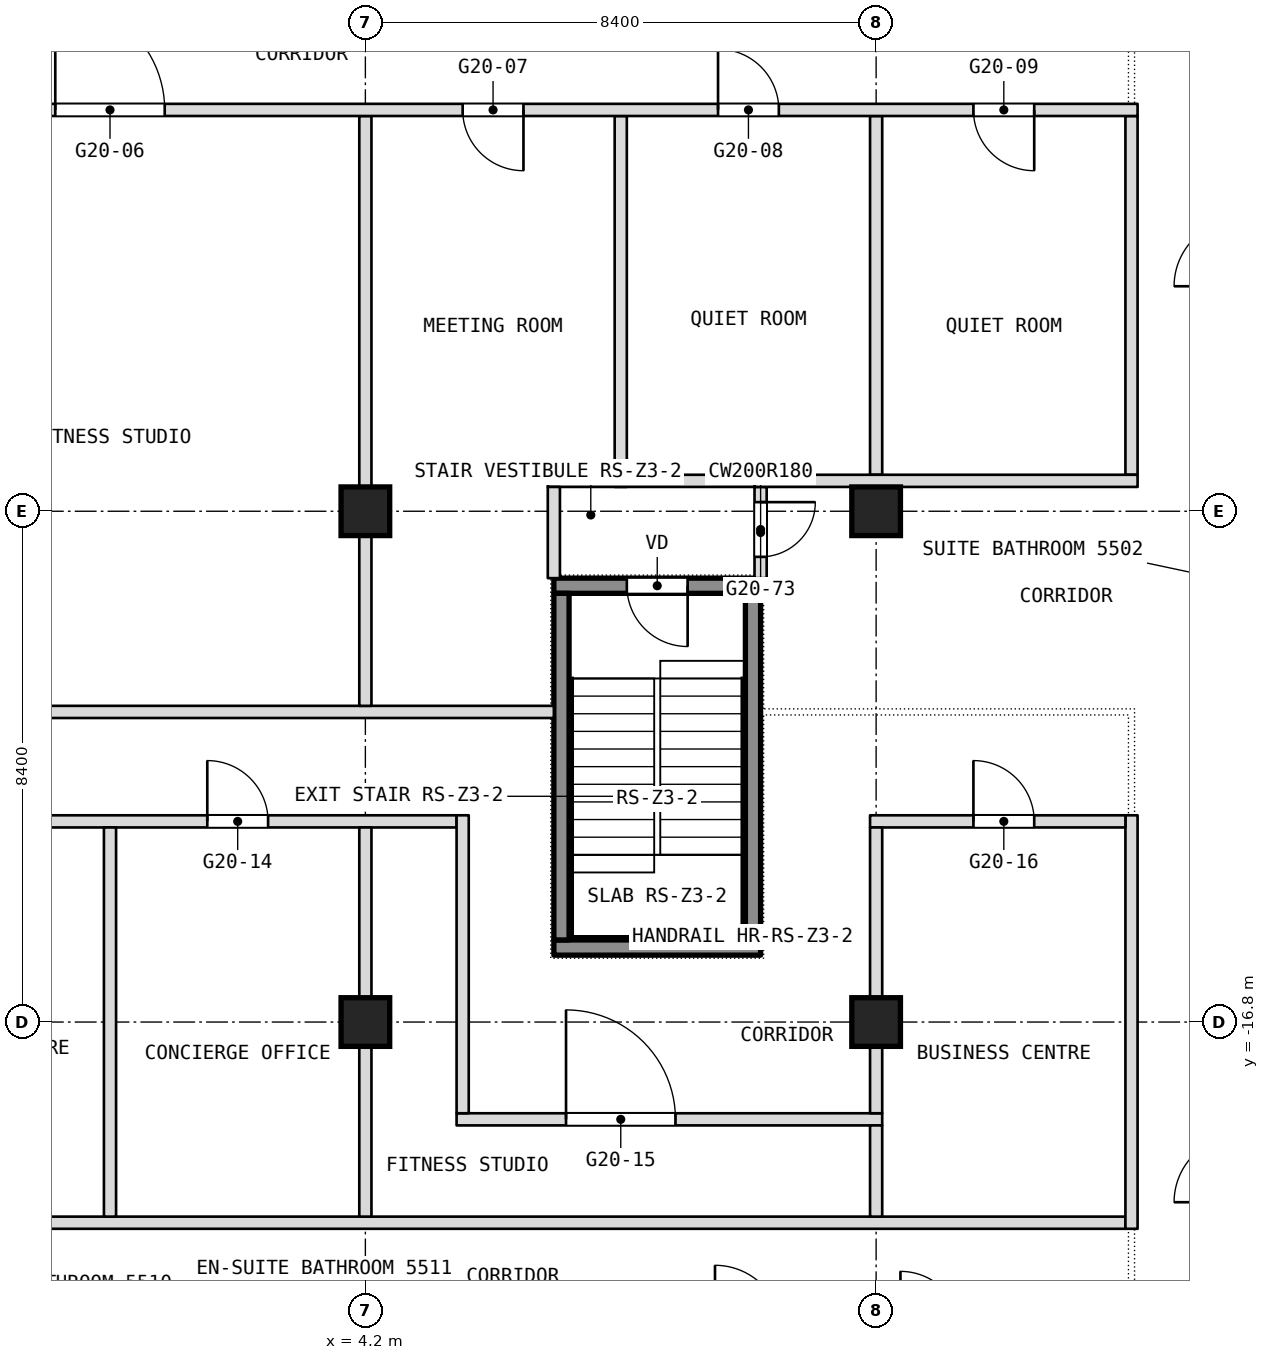
"""IFC4 building model, lengths in metres.
Left out: names, types, materials, properties, quantities, classifications, styles, units other than length and angle.
Written with IfcOpenShell. Run it as: python <this file> out.ifc"""

import sys

from ifc_helpers import new_model, si_unit, direction, frame, frame_2d, origin, origin_2d, place, context, subcontext, project, spatial, rectangle, extrude, element, fill, save


model = new_model("IFC4")
c1 = context("Model", 3, precision=1e-05, world=origin(), true_north=direction((0.0, 1.0)))
c2 = subcontext(c1, "Body", "Model", "MODEL_VIEW")
j1 = project(units=[si_unit("LENGTHUNIT", "METRE"), si_unit("PLANEANGLEUNIT", "RADIAN")], contexts=[c1])
p1 = place(None, origin())
s1 = spatial("IfcSite", under=j1, at=p1, CompositionType="ELEMENT")
p2 = place(p1, origin())
s2 = spatial("IfcBuilding", under=s1, at=p2, CompositionType="ELEMENT")
p3 = place(p2, frame((0.0, 0.0, 234.5)))
s3 = spatial("IfcBuildingStorey", under=s2, at=p3, CompositionType="ELEMENT", Elevation=234.5)
for number, where, z_axis, x_axis in (
    (1, (4.2, -16.8, 0.0), (0.0, 0.0, 1.0), (1.0, 0.0, 0.0)),
    (2, (4.2, -8.4, 0.0), (0.0, 0.0, 1.0), (1.0, 0.0, 0.0)),
    (3, (12.6, -16.8, 0.0), (0.0, 0.0, 1.0), (1.0, 0.0, 0.0)),
    (4, (12.6, -8.4, 0.0), (0.0, 0.0, 1.0), (1.0, 0.0, 0.0)),
):
    element("IfcColumn", number, at=place(p3, frame(where, z_axis=z_axis, x_axis=x_axis)), inside=s3, PredefinedType="COLUMN", context=c2, shape_type="SweptSolid", body=[
        extrude(rectangle(XDim=0.8, YDim=0.8, at=origin_2d()), origin(), (0.0, 0.0, 1.0), 3.6),
    ])
p4 = place(p3, frame((-16.7, -20.1, 0.0), z_axis=(0.0, 0.0, 1.0), x_axis=(1.0, 0.0, 0.0)))
e5 = element("IfcWall", 5, at=p4, inside=s3, PredefinedType="PARTITIONING", context=c2, shape_type="SweptSolid", body=[
    extrude(rectangle(XDim=33.4, YDim=0.2, at=frame_2d((16.7, 0.0))), origin(), (0.0, 0.0, 1.0), 3.34),
])
p5 = place(p3, frame((5.7, -18.4, 0.0), z_axis=(0.0, 0.0, 1.0), x_axis=(1.0, 0.0, 0.0)))
e6 = element("IfcWall", 6, at=p5, inside=s3, PredefinedType="PARTITIONING", context=c2, shape_type="SweptSolid", body=[
    extrude(rectangle(XDim=7.0, YDim=0.2, at=frame_2d((3.5, 0.0))), origin(), (0.0, 0.0, 1.0), 3.34),
])
p6 = place(p5, frame((1.8, 0.0, 0.0)))
e7 = element("IfcOpeningElement", 7, at=p6, cuts=e6, PredefinedType="OPENING", context=c2, shape_type="SweptSolid", body=[
    extrude(rectangle(XDim=1.8, YDim=2.1, at=frame_2d((0.9, 1.05))), frame((0.0, 0.1, 0.0), z_axis=(0.0, -1.0, 0.0), x_axis=(1.0, 0.0, 0.0)), (0.0, 0.0, 1.0), 0.2),
])
p7 = place(p3, frame((16.8, -20.2, 0.0), z_axis=(0.0, 0.0, 1.0), x_axis=(0.0, 1.0, 0.0)))
e8 = element("IfcWall", 8, at=p7, inside=s3, PredefinedType="PARTITIONING", context=c2, shape_type="SweptSolid", body=[
    extrude(rectangle(XDim=6.8, YDim=0.2, at=frame_2d((3.4, 0.0))), origin(), (0.0, 0.0, 1.0), 3.34),
])
p8 = place(p3, frame((16.8, -7.8, 0.0), z_axis=(0.0, 0.0, 1.0), x_axis=(0.0, 1.0, 0.0)))
e9 = element("IfcWall", 9, at=p8, inside=s3, PredefinedType="PARTITIONING", context=c2, shape_type="SweptSolid", body=[
    extrude(rectangle(XDim=5.9, YDim=0.2, at=frame_2d((2.95, 0.0))), origin(), (0.0, 0.0, 1.0), 3.34),
])
p9 = place(p3, frame((-5.9, -13.5, 0.0), z_axis=(0.0, 0.0, 1.0), x_axis=(1.0, 0.0, 0.0)))
e10 = element("IfcWall", 10, at=p9, inside=s3, PredefinedType="PARTITIONING", context=c2, shape_type="SweptSolid", body=[
    extrude(rectangle(XDim=11.6, YDim=0.2, at=frame_2d((5.8, 0.0))), origin(), (0.0, 0.0, 1.0), 3.34),
])
p10 = place(p9, frame((3.3, 0.0, 0.0)))
e11 = element("IfcOpeningElement", 11, at=p10, cuts=e10, PredefinedType="OPENING", context=c2, shape_type="SweptSolid", body=[
    extrude(rectangle(XDim=1.0, YDim=2.1, at=frame_2d((0.5, 1.05))), frame((0.0, 0.1, 0.0), z_axis=(0.0, -1.0, 0.0), x_axis=(1.0, 0.0, 0.0)), (0.0, 0.0, 1.0), 0.2),
])
p11 = place(p9, frame((7.5, 0.0, 0.0)))
e12 = element("IfcOpeningElement", 12, at=p11, cuts=e10, PredefinedType="OPENING", context=c2, shape_type="SweptSolid", body=[
    extrude(rectangle(XDim=1.0, YDim=2.1, at=frame_2d((0.5, 1.05))), frame((0.0, 0.1, 0.0), z_axis=(0.0, -1.0, 0.0), x_axis=(1.0, 0.0, 0.0)), (0.0, 0.0, 1.0), 0.2),
])
p12 = place(p3, frame((12.5, -13.5, 0.0), z_axis=(0.0, 0.0, 1.0), x_axis=(1.0, 0.0, 0.0)))
e13 = element("IfcWall", 13, at=p12, inside=s3, PredefinedType="PARTITIONING", context=c2, shape_type="SweptSolid", body=[
    extrude(rectangle(XDim=4.2, YDim=0.2, at=frame_2d((2.1, 0.0))), origin(), (0.0, 0.0, 1.0), 3.34),
])
p13 = place(p12, frame((1.7, 0.0, 0.0)))
e14 = element("IfcOpeningElement", 14, at=p13, cuts=e13, PredefinedType="OPENING", context=c2, shape_type="SweptSolid", body=[
    extrude(rectangle(XDim=1.0, YDim=2.1, at=frame_2d((0.5, 1.05))), frame((0.0, 0.1, 0.0), z_axis=(0.0, -1.0, 0.0), x_axis=(1.0, 0.0, 0.0)), (0.0, 0.0, 1.0), 0.2),
])
p14 = place(p3, frame((12.6, -20.0, 0.0), z_axis=(0.0, 0.0, 1.0), x_axis=(0.0, 1.0, 0.0)))
e15 = element("IfcWall", 15, at=p14, inside=s3, PredefinedType="PARTITIONING", context=c2, shape_type="SweptSolid", body=[
    extrude(rectangle(XDim=1.5, YDim=0.2, at=frame_2d((0.75, 0.0))), origin(), (0.0, 0.0, 1.0), 3.34),
])
p15 = place(p3, frame((12.6, -7.8, 0.0), z_axis=(0.0, 0.0, 1.0), x_axis=(0.0, 1.0, 0.0)))
e16 = element("IfcWall", 16, at=p15, inside=s3, PredefinedType="PARTITIONING", context=c2, shape_type="SweptSolid", body=[
    extrude(rectangle(XDim=5.9, YDim=0.2, at=frame_2d((2.95, 0.0))), origin(), (0.0, 0.0, 1.0), 3.34),
])
p16 = place(p3, frame((12.6, -18.3, 0.0), z_axis=(0.0, 0.0, 1.0), x_axis=(0.0, 1.0, 0.0)))
e17 = element("IfcWall", 17, at=p16, inside=s3, PredefinedType="PARTITIONING", context=c2, shape_type="SweptSolid", body=[
    extrude(rectangle(XDim=4.7, YDim=0.2, at=frame_2d((2.35, 0.0))), origin(), (0.0, 0.0, 1.0), 3.34),
])
p17 = place(p3, frame((-7.3, -11.7, 0.0), z_axis=(0.0, 0.0, 1.0), x_axis=(1.0, 0.0, 0.0)))
e18 = element("IfcWall", 18, at=p17, inside=s3, PredefinedType="PARTITIONING", context=c2, shape_type="SweptSolid", body=[
    extrude(rectangle(XDim=14.6, YDim=0.2, at=frame_2d((7.3, 0.0))), origin(), (0.0, 0.0, 1.0), 3.34),
])
p18 = place(p3, frame((10.7, -9.5, 0.0), z_axis=(0.0, 0.0, 1.0), x_axis=(0.0, 1.0, 0.0)))
e19 = element("IfcWall", 19, at=p18, inside=s3, PredefinedType="PARTITIONING", context=c2, shape_type="SweptSolid", body=[
    extrude(rectangle(XDim=1.5, YDim=0.2, at=frame_2d((0.75, 0.0))), origin(), (0.0, 0.0, 1.0), 3.34),
])
p19 = place(p18, frame((0.35, 0.0, 0.0)))
e20 = element("IfcOpeningElement", 20, at=p19, cuts=e19, PredefinedType="OPENING", context=c2, shape_type="SweptSolid", body=[
    extrude(rectangle(XDim=0.9, YDim=2.1, at=frame_2d((0.45, 1.05))), frame((0.0, 0.1, 0.0), z_axis=(0.0, -1.0, 0.0), x_axis=(1.0, 0.0, 0.0)), (0.0, 0.0, 1.0), 0.2),
])
p20 = place(p3, frame((8.4, -8.0, 0.0), z_axis=(0.0, 0.0, 1.0), x_axis=(0.0, 1.0, 0.0)))
e21 = element("IfcWall", 21, at=p20, inside=s3, PredefinedType="PARTITIONING", context=c2, shape_type="SweptSolid", body=[
    extrude(rectangle(XDim=6.1, YDim=0.2, at=frame_2d((3.05, 0.0))), origin(), (0.0, 0.0, 1.0), 3.34),
])
p21 = place(p3, frame((10.6, -7.9, 0.0), z_axis=(0.0, 0.0, 1.0), x_axis=(1.0, 0.0, 0.0)))
e22 = element("IfcWall", 22, at=p21, inside=s3, PredefinedType="PARTITIONING", context=c2, shape_type="SweptSolid", body=[
    extrude(rectangle(XDim=6.3, YDim=0.2, at=frame_2d((3.15, 0.0))), origin(), (0.0, 0.0, 1.0), 3.34),
])
p22 = place(p3, frame((7.2, -7.9, 0.0), z_axis=(0.0, 0.0, 1.0), x_axis=(1.0, 0.0, 0.0)))
e23 = element("IfcWall", 23, at=p22, inside=s3, PredefinedType="PARTITIONING", context=c2, shape_type="SweptSolid", body=[
    extrude(rectangle(XDim=3.4, YDim=0.2, at=frame_2d((1.7, 0.0))), origin(), (0.0, 0.0, 1.0), 3.34),
])
p23 = place(p3, frame((7.3, -9.5, 0.0), z_axis=(0.0, 0.0, 1.0), x_axis=(0.0, 1.0, 0.0)))
e24 = element("IfcWall", 24, at=p23, inside=s3, PredefinedType="PARTITIONING", context=c2, shape_type="SweptSolid", body=[
    extrude(rectangle(XDim=1.5, YDim=0.2, at=frame_2d((0.75, 0.0))), origin(), (0.0, 0.0, 1.0), 3.34),
])
p24 = place(p3, frame((5.8, -18.3, 0.0), z_axis=(0.0, 0.0, 1.0), x_axis=(0.0, 1.0, 0.0)))
e25 = element("IfcWall", 25, at=p24, inside=s3, PredefinedType="PARTITIONING", context=c2, shape_type="SweptSolid", body=[
    extrude(rectangle(XDim=4.9, YDim=0.2, at=frame_2d((2.45, 0.0))), origin(), (0.0, 0.0, 1.0), 3.34),
])
p25 = place(p3, frame((4.2, -20.0, 0.0), z_axis=(0.0, 0.0, 1.0), x_axis=(0.0, 1.0, 0.0)))
e26 = element("IfcWall", 26, at=p25, inside=s3, PredefinedType="PARTITIONING", context=c2, shape_type="SweptSolid", body=[
    extrude(rectangle(XDim=6.4, YDim=0.2, at=frame_2d((3.2, 0.0))), origin(), (0.0, 0.0, 1.0), 3.34),
])
p26 = place(p3, frame((4.2, -11.6, 0.0), z_axis=(0.0, 0.0, 1.0), x_axis=(0.0, 1.0, 0.0)))
e27 = element("IfcWall", 27, at=p26, inside=s3, PredefinedType="PARTITIONING", context=c2, shape_type="SweptSolid", body=[
    extrude(rectangle(XDim=9.7, YDim=0.2, at=frame_2d((4.85, 0.0))), origin(), (0.0, 0.0, 1.0), 3.34),
])
p27 = place(p3, frame((-16.9, -1.8, 0.0), z_axis=(0.0, 0.0, 1.0), x_axis=(1.0, 0.0, 0.0)))
e28 = element("IfcWall", 28, at=p27, inside=s3, PredefinedType="PARTITIONING", context=c2, shape_type="SweptSolid", body=[
    extrude(rectangle(XDim=33.8, YDim=0.2, at=frame_2d((16.9, 0.0))), origin(), (0.0, 0.0, 1.0), 3.34),
])
p28 = place(p27, frame((1.7, 0.0, 0.0)))
e29 = element("IfcOpeningElement", 29, at=p28, cuts=e28, PredefinedType="OPENING", context=c2, shape_type="SweptSolid", body=[
    extrude(rectangle(XDim=1.0, YDim=2.1, at=frame_2d((0.5, 1.05))), frame((0.0, 0.1, 0.0), z_axis=(0.0, -1.0, 0.0), x_axis=(1.0, 0.0, 0.0)), (0.0, 0.0, 1.0), 0.2),
])
p29 = place(p27, frame((5.9, 0.0, 0.0)))
e30 = element("IfcOpeningElement", 30, at=p29, cuts=e28, PredefinedType="OPENING", context=c2, shape_type="SweptSolid", body=[
    extrude(rectangle(XDim=1.0, YDim=2.1, at=frame_2d((0.5, 1.05))), frame((0.0, 0.1, 0.0), z_axis=(0.0, -1.0, 0.0), x_axis=(1.0, 0.0, 0.0)), (0.0, 0.0, 1.0), 0.2),
])
p30 = place(p27, frame((10.1, 0.0, 0.0)))
e31 = element("IfcOpeningElement", 31, at=p30, cuts=e28, PredefinedType="OPENING", context=c2, shape_type="SweptSolid", body=[
    extrude(rectangle(XDim=1.0, YDim=2.1, at=frame_2d((0.5, 1.05))), frame((0.0, 0.1, 0.0), z_axis=(0.0, -1.0, 0.0), x_axis=(1.0, 0.0, 0.0)), (0.0, 0.0, 1.0), 0.2),
])
p31 = place(p27, frame((16.0, 0.0, 0.0)))
e32 = element("IfcOpeningElement", 32, at=p31, cuts=e28, PredefinedType="OPENING", context=c2, shape_type="SweptSolid", body=[
    extrude(rectangle(XDim=1.8, YDim=2.1, at=frame_2d((0.9, 1.05))), frame((0.0, 0.1, 0.0), z_axis=(0.0, -1.0, 0.0), x_axis=(1.0, 0.0, 0.0)), (0.0, 0.0, 1.0), 0.2),
])
p32 = place(p27, frame((22.7, 0.0, 0.0)))
e33 = element("IfcOpeningElement", 33, at=p32, cuts=e28, PredefinedType="OPENING", context=c2, shape_type="SweptSolid", body=[
    extrude(rectangle(XDim=1.0, YDim=2.1, at=frame_2d((0.5, 1.05))), frame((0.0, 0.1, 0.0), z_axis=(0.0, -1.0, 0.0), x_axis=(1.0, 0.0, 0.0)), (0.0, 0.0, 1.0), 0.2),
])
p33 = place(p27, frame((26.9, 0.0, 0.0)))
e34 = element("IfcOpeningElement", 34, at=p33, cuts=e28, PredefinedType="OPENING", context=c2, shape_type="SweptSolid", body=[
    extrude(rectangle(XDim=1.0, YDim=2.1, at=frame_2d((0.5, 1.05))), frame((0.0, 0.1, 0.0), z_axis=(0.0, -1.0, 0.0), x_axis=(1.0, 0.0, 0.0)), (0.0, 0.0, 1.0), 0.2),
])
p34 = place(p27, frame((31.1, 0.0, 0.0)))
e35 = element("IfcOpeningElement", 35, at=p34, cuts=e28, PredefinedType="OPENING", context=c2, shape_type="SweptSolid", body=[
    extrude(rectangle(XDim=1.0, YDim=2.1, at=frame_2d((0.5, 1.05))), frame((0.0, 0.1, 0.0), z_axis=(0.0, -1.0, 0.0), x_axis=(1.0, 0.0, 0.0)), (0.0, 0.0, 1.0), 0.2),
])
p35 = place(p3, frame((0.0, -20.0, 0.0), z_axis=(0.0, 0.0, 1.0), x_axis=(0.0, 1.0, 0.0)))
e36 = element("IfcWall", 36, at=p35, inside=s3, PredefinedType="PARTITIONING", context=c2, shape_type="SweptSolid", body=[
    extrude(rectangle(XDim=6.4, YDim=0.2, at=frame_2d((3.2, 0.0))), origin(), (0.0, 0.0, 1.0), 3.34),
])
p36 = place(p3, frame((7.3, -15.575, 0.1), z_axis=(0.0, 0.0, 1.0), x_axis=(1.0, 0.0, 0.0)))
e37 = element("IfcWall", 37, at=p36, inside=s3, PredefinedType="SHEAR", context=c2, shape_type="SweptSolid", body=[
    extrude(rectangle(XDim=3.4, YDim=0.25, at=frame_2d((1.7, 0.0))), origin(), (0.0, 0.0, 1.0), 3.6),
])
p37 = place(p3, frame((7.3, -9.625, 0.1), z_axis=(0.0, 0.0, 1.0), x_axis=(1.0, 0.0, 0.0)))
e38 = element("IfcWall", 38, at=p37, inside=s3, PredefinedType="SHEAR", context=c2, shape_type="SweptSolid", body=[
    extrude(rectangle(XDim=3.4, YDim=0.25, at=frame_2d((1.7, 0.0))), origin(), (0.0, 0.0, 1.0), 3.6),
])
p38 = place(p37, frame((1.2, 0.0, 0.0)))
e39 = element("IfcOpeningElement", 39, at=p38, cuts=e38, PredefinedType="OPENING", context=c2, shape_type="SweptSolid", body=[
    extrude(rectangle(XDim=1.0, YDim=2.1, at=frame_2d((0.5, 1.05))), frame((0.0, 0.125, 0.0), z_axis=(0.0, -1.0, 0.0), x_axis=(1.0, 0.0, 0.0)), (0.0, 0.0, 1.0), 0.25),
])
for number, where, z_axis, x_axis in (
    (40, (7.425, -15.45, 0.1), (0.0, 0.0, 1.0), (0.0, 1.0, 0.0)),
    (41, (10.575, -15.45, 0.1), (0.0, 0.0, 1.0), (0.0, 1.0, 0.0)),
):
    element("IfcWall", number, at=place(p3, frame(where, z_axis=z_axis, x_axis=x_axis)), inside=s3, PredefinedType="SHEAR", context=c2, shape_type="SweptSolid", body=[
        extrude(rectangle(XDim=5.7, YDim=0.25, at=frame_2d((2.85, 0.0))), origin(), (0.0, 0.0, 1.0), 3.6),
    ])
p39 = place(p6, origin())
e42 = element("IfcDoor", 42, at=p39, inside=s3, OperationType="DOUBLE_DOOR_SINGLE_SWING", PredefinedType="DOOR", context=c2, shape_type="SweptSolid", body=[
    extrude(rectangle(XDim=1.8, YDim=2.1, at=frame_2d((0.9, 1.05))), frame((0.0, 0.025, 0.0), z_axis=(0.0, -1.0, 0.0), x_axis=(1.0, 0.0, 0.0)), (0.0, 0.0, 1.0), 0.05),
])
fill(e7, e42)
p40 = place(p11, origin())
e43 = element("IfcDoor", 43, at=p40, inside=s3, OperationType="SINGLE_SWING_RIGHT", PredefinedType="DOOR", context=c2, shape_type="SweptSolid", body=[
    extrude(rectangle(XDim=1.0, YDim=2.1, at=frame_2d((0.5, 1.05))), frame((0.0, 0.025, 0.0), z_axis=(0.0, -1.0, 0.0), x_axis=(1.0, 0.0, 0.0)), (0.0, 0.0, 1.0), 0.05),
])
fill(e12, e43)
p41 = place(p13, origin())
e44 = element("IfcDoor", 44, at=p41, inside=s3, OperationType="SINGLE_SWING_RIGHT", PredefinedType="DOOR", context=c2, shape_type="SweptSolid", body=[
    extrude(rectangle(XDim=1.0, YDim=2.1, at=frame_2d((0.5, 1.05))), frame((0.0, 0.025, 0.0), z_axis=(0.0, -1.0, 0.0), x_axis=(1.0, 0.0, 0.0)), (0.0, 0.0, 1.0), 0.05),
])
fill(e14, e44)
p42 = place(p19, origin())
e45 = element("IfcDoor", 45, at=p42, inside=s3, OperationType="SINGLE_SWING_RIGHT", PredefinedType="DOOR", context=c2, shape_type="SweptSolid", body=[
    extrude(rectangle(XDim=0.9, YDim=2.1, at=frame_2d((0.45, 1.05))), frame((0.0, 0.025, 0.0), z_axis=(0.0, -1.0, 0.0), x_axis=(1.0, 0.0, 0.0)), (0.0, 0.0, 1.0), 0.05),
])
fill(e20, e45)
p43 = place(p31, origin())
e46 = element("IfcDoor", 46, at=p43, inside=s3, OperationType="DOUBLE_DOOR_SINGLE_SWING", PredefinedType="DOOR", context=c2, shape_type="SweptSolid", body=[
    extrude(rectangle(XDim=1.8, YDim=2.1, at=frame_2d((0.9, 1.05))), frame((0.0, 0.025, 0.0), z_axis=(0.0, -1.0, 0.0), x_axis=(1.0, 0.0, 0.0)), (0.0, 0.0, 1.0), 0.05),
])
fill(e32, e46)
p44 = place(p32, origin())
e47 = element("IfcDoor", 47, at=p44, inside=s3, OperationType="SINGLE_SWING_RIGHT", PredefinedType="DOOR", context=c2, shape_type="SweptSolid", body=[
    extrude(rectangle(XDim=1.0, YDim=2.1, at=frame_2d((0.5, 1.05))), frame((0.0, 0.025, 0.0), z_axis=(0.0, -1.0, 0.0), x_axis=(1.0, 0.0, 0.0)), (0.0, 0.0, 1.0), 0.05),
])
fill(e33, e47)
p45 = place(p33, origin())
e48 = element("IfcDoor", 48, at=p45, inside=s3, OperationType="SINGLE_SWING_LEFT", PredefinedType="DOOR", context=c2, shape_type="SweptSolid", body=[
    extrude(rectangle(XDim=1.0, YDim=2.1, at=frame_2d((0.5, 1.05))), frame((0.0, 0.025, 0.0), z_axis=(0.0, -1.0, 0.0), x_axis=(1.0, 0.0, 0.0)), (0.0, 0.0, 1.0), 0.05),
])
fill(e34, e48)
p46 = place(p34, origin())
e49 = element("IfcDoor", 49, at=p46, inside=s3, OperationType="SINGLE_SWING_RIGHT", PredefinedType="DOOR", context=c2, shape_type="SweptSolid", body=[
    extrude(rectangle(XDim=1.0, YDim=2.1, at=frame_2d((0.5, 1.05))), frame((0.0, 0.025, 0.0), z_axis=(0.0, -1.0, 0.0), x_axis=(1.0, 0.0, 0.0)), (0.0, 0.0, 1.0), 0.05),
])
fill(e35, e49)
p47 = place(p38, origin())
e50 = element("IfcDoor", 50, at=p47, inside=s3, OperationType="SINGLE_SWING_LEFT", PredefinedType="DOOR", context=c2, shape_type="SweptSolid", body=[
    extrude(rectangle(XDim=1.0, YDim=2.1, at=frame_2d((0.5, 1.05))), frame((0.0, 0.025, 0.0), z_axis=(0.0, -1.0, 0.0), x_axis=(1.0, 0.0, 0.0)), (0.0, 0.0, 1.0), 0.05),
])
fill(e39, e50)
save(model, sys.argv[1])
